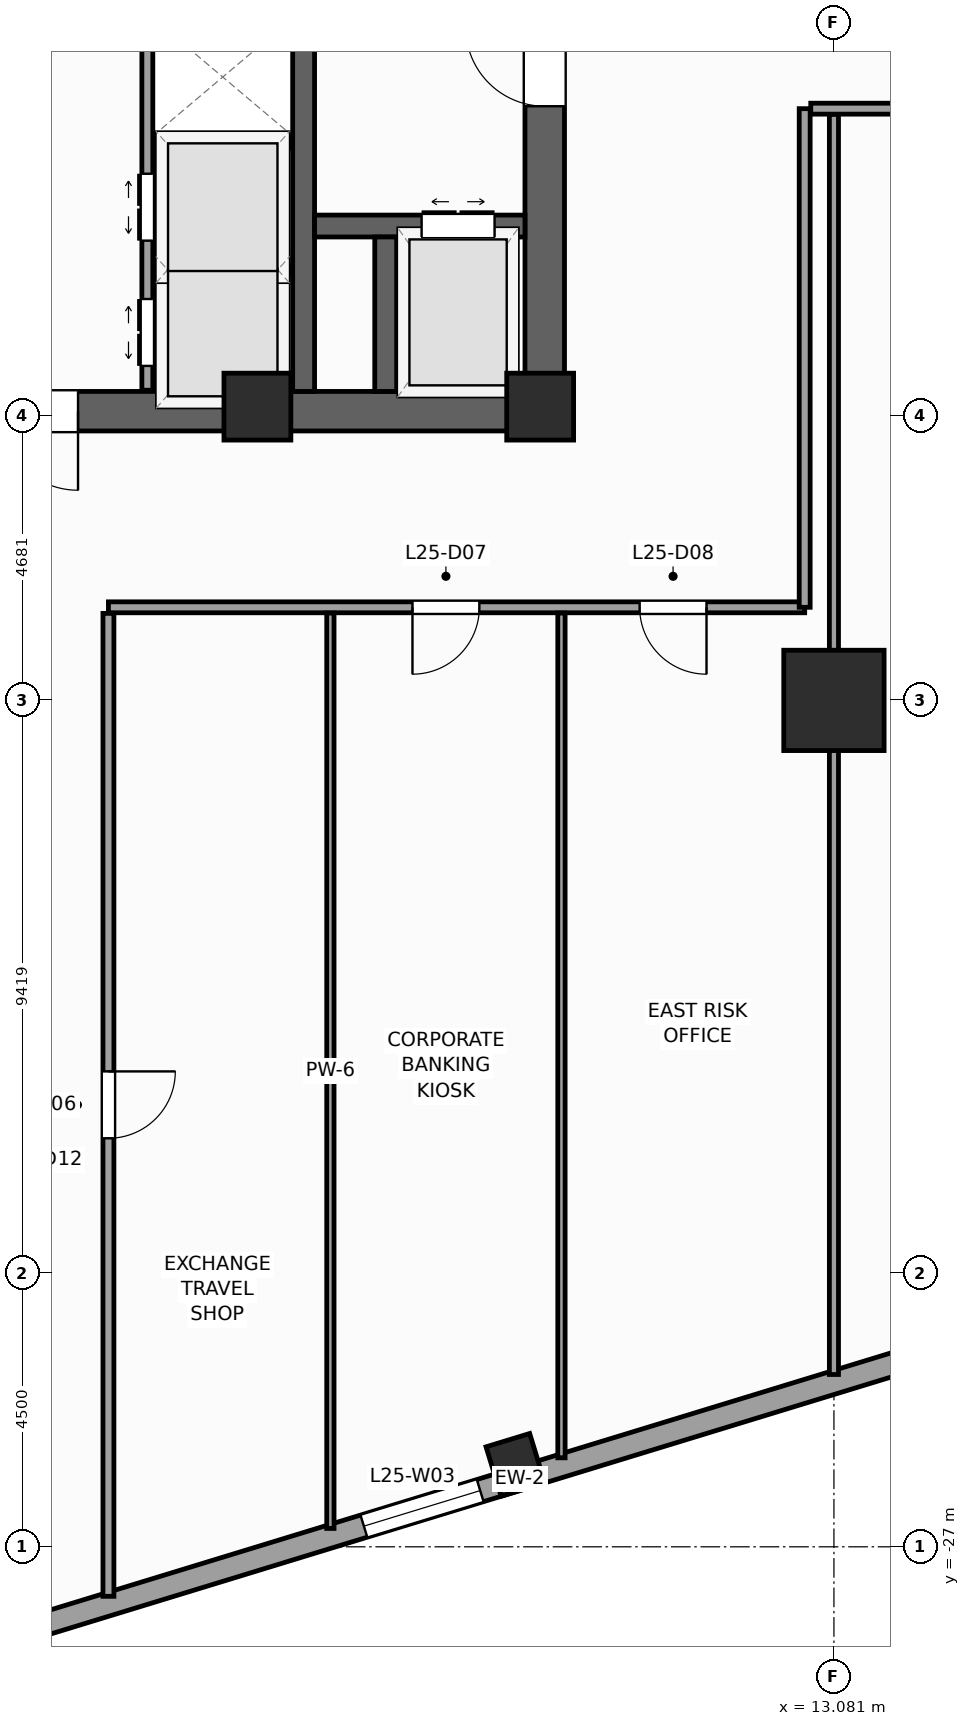
"""IFC4 building model, lengths in metres.
Left out: names, types, materials, properties, quantities, classifications, styles, units other than length and angle.
Written with IfcOpenShell. Run it as: python <this file> out.ifc"""

import sys

from ifc_helpers import new_model, si_unit, direction, frame, frame_2d, origin, origin_2d, place, context, subcontext, project, spatial, rectangle, extrude, source, transform, mapped, element, fill, save


model = new_model("IFC4")
c1 = context("Model", 3, precision=1e-05, world=origin(), true_north=direction((0.0, 1.0)))
c2 = subcontext(c1, "Body", "Model", "MODEL_VIEW")
j1 = project(units=[si_unit("LENGTHUNIT", "METRE"), si_unit("PLANEANGLEUNIT", "RADIAN")], contexts=[c1])
p1 = place(None, origin())
s1 = spatial("IfcSite", under=j1, at=p1, CompositionType="ELEMENT")
p2 = place(p1, origin())
s2 = spatial("IfcBuilding", under=s1, at=p2, CompositionType="ELEMENT")
p3 = place(p2, frame((0.0, 0.0, 107.2)))
s3 = spatial("IfcBuildingStorey", under=s2, at=p3, CompositionType="ELEMENT", Elevation=107.2)
p4 = place(p3, frame((-8.65, -8.325, 0.0), z_axis=(0.0, 0.0, 1.0), x_axis=(1.0, 0.0, 0.0)))
e1 = element("IfcWall", 1, at=p4, inside=s3, PredefinedType="SHEAR", context=c2, shape_type="SweptSolid", body=[
    extrude(rectangle(XDim=17.3, YDim=0.65, at=frame_2d((8.65, 0.0))), origin(), (0.0, 0.0, 1.0), 4.0),
])
p5 = place(p4, frame((8.0, 0.0, 0.0)))
e2 = element("IfcOpeningElement", 2, at=p5, cuts=e1, PredefinedType="OPENING", context=c2, shape_type="SweptSolid", body=[
    extrude(rectangle(XDim=1.3, YDim=2.2, at=frame_2d((0.65, 1.1))), frame((0.0, 0.335, 0.0), z_axis=(0.0, -1.0, 0.0), x_axis=(1.0, 0.0, 0.0)), (0.0, 0.0, 1.0), 0.67),
])
p6 = place(p3, frame((8.325, -8.0, 0.0), z_axis=(0.0, 0.0, 1.0), x_axis=(0.0, 1.0, 0.0)))
e3 = element("IfcWall", 3, at=p6, inside=s3, PredefinedType="SHEAR", context=c2, shape_type="SweptSolid", body=[
    extrude(rectangle(XDim=16.0, YDim=0.65, at=frame_2d((8.0, 0.0))), origin(), (0.0, 0.0, 1.0), 4.0),
])
p7 = place(p6, frame((4.69, 0.0, 0.0)))
e4 = element("IfcOpeningElement", 4, at=p7, cuts=e3, PredefinedType="OPENING", context=c2, shape_type="SweptSolid", body=[
    extrude(rectangle(XDim=1.3, YDim=2.2, at=frame_2d((0.65, 1.1))), frame((0.0, 0.335, 0.0), z_axis=(0.0, -1.0, 0.0), x_axis=(1.0, 0.0, 0.0)), (0.0, 0.0, 1.0), 0.67),
])
p8 = place(p3, frame((4.36, -8.0, 0.0), z_axis=(0.0, 0.0, 1.0), x_axis=(0.0, 1.0, 0.0)))
e5 = element("IfcWall", 5, at=p8, inside=s3, PredefinedType="SHEAR", context=c2, shape_type="SweptSolid", body=[
    extrude(rectangle(XDim=16.0, YDim=0.36, at=frame_2d((8.0, 0.0))), origin(), (0.0, 0.0, 1.0), 4.0),
])
p9 = place(p3, frame((4.54, -5.28, 0.0), z_axis=(0.0, 0.0, 1.0), x_axis=(1.0, 0.0, 0.0)))
e6 = element("IfcWall", 6, at=p9, inside=s3, PredefinedType="SHEAR", context=c2, shape_type="SweptSolid", body=[
    extrude(rectangle(XDim=3.46, YDim=0.36, at=frame_2d((1.73, 0.0))), origin(), (0.0, 0.0, 1.0), 4.0),
])
p10 = place(p9, frame((1.76, 0.0, 0.0)))
e7 = element("IfcOpeningElement", 7, at=p10, cuts=e6, PredefinedType="OPENING", context=c2, shape_type="SweptSolid", body=[
    extrude(rectangle(XDim=1.2, YDim=2.25, at=frame_2d((0.6, 1.125))), frame((0.0, 0.19, 0.0), z_axis=(0.0, -1.0, 0.0), x_axis=(1.0, 0.0, 0.0)), (0.0, 0.0, 1.0), 0.38),
])
p11 = place(p3, frame((5.71, -8.0, 0.0), z_axis=(0.0, 0.0, 1.0), x_axis=(0.0, 1.0, 0.0)))
e8 = element("IfcWall", 8, at=p11, inside=s3, PredefinedType="SHEAR", context=c2, shape_type="SweptSolid", body=[
    extrude(rectangle(XDim=2.54, YDim=0.36, at=frame_2d((1.27, 0.0))), origin(), (0.0, 0.0, 1.0), 4.0),
])
m1 = source(origin(), c2, "Body", "SweptSolid", [
    extrude(rectangle(XDim=1.1, YDim=1.1, at=origin_2d()), origin(), (0.0, 0.0, 1.0), 4.0),
])
for number, where, z_axis, x_axis in (
    (9, (8.25, -8.25, 0.0), (0.0, 0.0, 1.0), (1.0, 0.0, 0.0)),
    (10, (3.6, -8.25, 0.0), (0.0, 0.0, 1.0), (1.0, 0.0, 0.0)),
):
    element("IfcColumn", number, at=place(p3, frame(where, z_axis=z_axis, x_axis=x_axis)), inside=s3, PredefinedType="PILASTER", context=c2, shape_type="MappedRepresentation", body=[
        mapped(m1, transform((0.0, 0.0, 0.0), scale=1.0)),
    ])
m2 = source(origin(), c2, "Body", "SweptSolid", [
    extrude(rectangle(XDim=1.65, YDim=1.65, at=origin_2d()), origin(), (0.0, 0.0, 1.0), 4.0),
])
p12 = place(p3, frame((13.081, -13.081, 0.0), z_axis=(0.0, 0.0, 1.0), x_axis=(1.0, 0.0, 0.0)))
e11 = element("IfcColumn", 11, at=p12, inside=s3, PredefinedType="COLUMN", context=c2, shape_type="MappedRepresentation", body=[
    mapped(m2, transform((0.0, 0.0, 0.0), scale=1.0)),
])
m3 = source(origin(), c2, "Body", "SweptSolid", [
    extrude(rectangle(XDim=0.75, YDim=0.85, at=origin_2d()), origin(), (0.0, 0.0, 1.0), 4.0),
])
p13 = place(p3, frame((7.843, -25.653, 0.0), z_axis=(0.0, 0.0, 1.0), x_axis=(0.956304755963, 0.292371704723, 0.0)))
e12 = element("IfcColumn", 12, at=p13, inside=s3, PredefinedType="COLUMN", context=c2, shape_type="MappedRepresentation", body=[
    mapped(m3, transform((0.0, 0.0, 0.0), scale=1.0)),
])
p14 = place(p3, frame((-14.265, -32.658, 0.0), z_axis=(0.0, 0.0, 1.0), x_axis=(0.956304320851, 0.292373127906, 0.0)))
e13 = element("IfcWall", 13, at=p14, inside=s3, PredefinedType="STANDARD", context=c2, shape_type="SweptSolid", body=[
    extrude(rectangle(XDim=46.38, YDim=0.38, at=frame_2d((23.19, 0.0))), origin(), (0.0, 0.0, 1.0), 3.14),
])
p15 = place(p14, frame((4.865, 0.0, 0.51)))
e14 = element("IfcOpeningElement", 14, at=p15, cuts=e13, PredefinedType="OPENING", context=c2, shape_type="SweptSolid", body=[
    extrude(rectangle(XDim=1.4, YDim=2.4, at=frame_2d((0.7, 1.2))), frame((0.0, 0.2, 0.0), z_axis=(0.0, -1.0, 0.0), x_axis=(1.0, 0.0, 0.0)), (0.0, 0.0, 1.0), 0.4),
])
p16 = place(p14, frame((10.95, 0.0, 0.51)))
e15 = element("IfcOpeningElement", 15, at=p16, cuts=e13, PredefinedType="OPENING", context=c2, shape_type="SweptSolid", body=[
    extrude(rectangle(XDim=2.0, YDim=2.4, at=frame_2d((1.0, 1.2))), frame((0.0, 0.2, 0.0), z_axis=(0.0, -1.0, 0.0), x_axis=(1.0, 0.0, 0.0)), (0.0, 0.0, 1.0), 0.4),
])
p17 = place(p14, frame((20.512, 0.0, 0.51)))
e16 = element("IfcOpeningElement", 16, at=p17, cuts=e13, PredefinedType="OPENING", context=c2, shape_type="SweptSolid", body=[
    extrude(rectangle(XDim=2.0, YDim=2.4, at=frame_2d((1.0, 1.2))), frame((0.0, 0.2, 0.0), z_axis=(0.0, -1.0, 0.0), x_axis=(1.0, 0.0, 0.0)), (0.0, 0.0, 1.0), 0.4),
])
p18 = place(p14, frame((30.538, 0.0, 0.51)))
e17 = element("IfcOpeningElement", 17, at=p18, cuts=e13, PredefinedType="OPENING", context=c2, shape_type="SweptSolid", body=[
    extrude(rectangle(XDim=2.0, YDim=2.4, at=frame_2d((1.0, 1.2))), frame((0.0, 0.2, 0.0), z_axis=(0.0, -1.0, 0.0), x_axis=(1.0, 0.0, 0.0)), (0.0, 0.0, 1.0), 0.4),
])
p19 = place(p14, frame((39.187, 0.0, 0.51)))
e18 = element("IfcOpeningElement", 18, at=p19, cuts=e13, PredefinedType="OPENING", context=c2, shape_type="SweptSolid", body=[
    extrude(rectangle(XDim=1.4, YDim=2.4, at=frame_2d((0.7, 1.2))), frame((0.0, 0.2, 0.0), z_axis=(0.0, -1.0, 0.0), x_axis=(1.0, 0.0, 0.0)), (0.0, 0.0, 1.0), 0.4),
])
p20 = place(p3, frame((1.79, -7.98, 0.0), z_axis=(0.0, 0.0, 1.0), x_axis=(0.0, 1.0, 0.0)))
e19 = element("IfcWall", 19, at=p20, inside=s3, PredefinedType="PARTITIONING", context=c2, shape_type="SweptSolid", body=[
    extrude(rectangle(XDim=12.38, YDim=0.18, at=frame_2d((6.19, 0.0))), origin(), (0.0, 0.0, 1.0), 3.74),
])
p21 = place(p20, frame((0.4, 0.0, 0.0)))
e20 = element("IfcOpeningElement", 20, at=p21, cuts=e19, PredefinedType="OPENING", context=c2, shape_type="SweptSolid", body=[
    extrude(rectangle(XDim=1.1, YDim=2.2, at=frame_2d((0.55, 1.1))), frame((0.0, 0.1, 0.0), z_axis=(0.0, -1.0, 0.0), x_axis=(1.0, 0.0, 0.0)), (0.0, 0.0, 1.0), 0.2),
])
p22 = place(p20, frame((2.46, 0.0, 0.0)))
e21 = element("IfcOpeningElement", 21, at=p22, cuts=e19, PredefinedType="OPENING", context=c2, shape_type="SweptSolid", body=[
    extrude(rectangle(XDim=1.1, YDim=2.2, at=frame_2d((0.55, 1.1))), frame((0.0, 0.1, 0.0), z_axis=(0.0, -1.0, 0.0), x_axis=(1.0, 0.0, 0.0)), (0.0, 0.0, 1.0), 0.2),
])
p23 = place(p3, frame((1.89, -3.9, 0.0), z_axis=(0.0, 0.0, 1.0), x_axis=(1.0, 0.0, 0.0)))
e22 = element("IfcWall", 22, at=p23, inside=s3, PredefinedType="PARTITIONING", context=c2, shape_type="SweptSolid", body=[
    extrude(rectangle(XDim=2.28, YDim=0.18, at=frame_2d((1.14, 0.0))), origin(), (0.0, 0.0, 1.0), 3.74),
])
p24 = place(p3, frame((1.9, -6.0, 0.0), z_axis=(0.0, 0.0, 1.0), x_axis=(1.0, 0.0, 0.0)))
e23 = element("IfcWall", 23, at=p24, inside=s3, PredefinedType="PARTITIONING", context=c2, shape_type="SweptSolid", body=[
    extrude(rectangle(XDim=2.26, YDim=0.12, at=frame_2d((1.13, 0.0))), origin(), (0.0, 0.0, 1.0), 3.74),
])
p25 = place(p3, frame((1.15, -11.55, 0.0), z_axis=(0.0, 0.0, 1.0), x_axis=(1.0, 0.0, 0.0)))
e24 = element("IfcWall", 24, at=p25, inside=s3, PredefinedType="PARTITIONING", context=c2, shape_type="SweptSolid", body=[
    extrude(rectangle(XDim=11.45, YDim=0.18, at=frame_2d((5.725, 0.0))), origin(), (0.0, 0.0, 1.0), 3.74),
])
p26 = place(p25, frame((5.0, 0.0, 0.0)))
e25 = element("IfcOpeningElement", 25, at=p26, cuts=e24, PredefinedType="OPENING", context=c2, shape_type="SweptSolid", body=[
    extrude(rectangle(XDim=1.1, YDim=2.2, at=frame_2d((0.55, 1.1))), frame((0.0, 0.1, 0.0), z_axis=(0.0, -1.0, 0.0), x_axis=(1.0, 0.0, 0.0)), (0.0, 0.0, 1.0), 0.2),
])
p27 = place(p25, frame((8.736, 0.0, 0.0)))
e26 = element("IfcOpeningElement", 26, at=p27, cuts=e24, PredefinedType="OPENING", context=c2, shape_type="SweptSolid", body=[
    extrude(rectangle(XDim=1.1, YDim=2.2, at=frame_2d((0.55, 1.1))), frame((0.0, 0.1, 0.0), z_axis=(0.0, -1.0, 0.0), x_axis=(1.0, 0.0, 0.0)), (0.0, 0.0, 1.0), 0.2),
])
p28 = place(p3, frame((12.6, -11.55, 0.0), z_axis=(0.0, 0.0, 1.0), x_axis=(0.0, 1.0, 0.0)))
e27 = element("IfcWall", 27, at=p28, inside=s3, PredefinedType="PARTITIONING", context=c2, shape_type="SweptSolid", body=[
    extrude(rectangle(XDim=8.2, YDim=0.18, at=frame_2d((4.1, 0.0))), origin(), (0.0, 0.0, 1.0), 3.74),
])
p29 = place(p3, frame((12.7, -3.35, 0.0), z_axis=(0.0, 0.0, 1.0), x_axis=(1.0, 0.0, 0.0)))
e28 = element("IfcWall", 28, at=p29, inside=s3, PredefinedType="PARTITIONING", context=c2, shape_type="SweptSolid", body=[
    extrude(rectangle(XDim=16.49, YDim=0.18, at=frame_2d((8.245, 0.0))), origin(), (0.0, 0.0, 1.0), 3.74),
])
p30 = place(p29, frame((7.721, 0.0, 0.0)))
e29 = element("IfcOpeningElement", 29, at=p30, cuts=e28, PredefinedType="OPENING", context=c2, shape_type="SweptSolid", body=[
    extrude(rectangle(XDim=1.1, YDim=2.2, at=frame_2d((0.55, 1.1))), frame((0.0, 0.1, 0.0), z_axis=(0.0, -1.0, 0.0), x_axis=(1.0, 0.0, 0.0)), (0.0, 0.0, 1.0), 0.2),
])
p31 = place(p3, frame((1.15, -27.814, 0.0), z_axis=(0.0, 0.0, 1.0), x_axis=(0.0, 1.0, 0.0)))
e30 = element("IfcWall", 30, at=p31, inside=s3, PredefinedType="PARTITIONING", context=c2, shape_type="SweptSolid", body=[
    extrude(rectangle(XDim=16.164, YDim=0.18, at=frame_2d((8.082, 0.0))), origin(), (0.0, 0.0, 1.0), 3.74),
])
p32 = place(p31, frame((7.532, 0.0, 0.0)))
e31 = element("IfcOpeningElement", 31, at=p32, cuts=e30, PredefinedType="OPENING", context=c2, shape_type="SweptSolid", body=[
    extrude(rectangle(XDim=1.1, YDim=2.2, at=frame_2d((0.55, 1.1))), frame((0.0, 0.1, 0.0), z_axis=(0.0, -1.0, 0.0), x_axis=(1.0, 0.0, 0.0)), (0.0, 0.0, 1.0), 0.2),
])
p33 = place(p3, frame((4.8, -26.698, 0.0), z_axis=(0.0, 0.0, 1.0), x_axis=(0.0, 1.0, 0.0)))
e32 = element("IfcWall", 32, at=p33, inside=s3, PredefinedType="PARTITIONING", context=c2, shape_type="SweptSolid", body=[
    extrude(rectangle(XDim=15.053, YDim=0.12, at=frame_2d((7.527, 0.0))), origin(), (0.0, 0.0, 1.0), 3.74),
])
p34 = place(p3, frame((8.6, -25.536, 0.0), z_axis=(0.0, 0.0, 1.0), x_axis=(0.0, 1.0, 0.0)))
e33 = element("IfcWall", 33, at=p34, inside=s3, PredefinedType="PARTITIONING", context=c2, shape_type="SweptSolid", body=[
    extrude(rectangle(XDim=13.891, YDim=0.12, at=frame_2d((6.946, 0.0))), origin(), (0.0, 0.0, 1.0), 3.04),
])
p35 = place(p3, frame((13.081, -24.167, 0.0), z_axis=(0.0, 0.0, 1.0), x_axis=(0.0, 1.0, 0.0)))
e34 = element("IfcWall", 34, at=p35, inside=s3, PredefinedType="PARTITIONING", context=c2, shape_type="SweptSolid", body=[
    extrude(rectangle(XDim=20.721, YDim=0.15, at=frame_2d((10.361, 0.0))), origin(), (0.0, 0.0, 1.0), 2.732),
])
m4 = source(origin(), c2, "Body", "SweptSolid", [
    extrude(rectangle(XDim=2.0, YDim=2.4, at=frame_2d((1.0, 1.2))), frame((0.0, 0.03, 0.0), z_axis=(0.0, -1.0, 0.0), x_axis=(1.0, 0.0, 0.0)), (0.0, 0.0, 1.0), 0.06),
])
p36 = place(p17, origin())
e35 = element("IfcWindow", 35, at=p36, inside=s3, PartitioningType="SINGLE_PANEL", PredefinedType="WINDOW", context=c2, shape_type="MappedRepresentation", body=[
    mapped(m4, transform((0.0, 0.0, 0.0), scale=1.0)),
])
fill(e16, e35)
m5 = source(origin(), c2, "Body", "SweptSolid", [
    extrude(rectangle(XDim=1.3, YDim=2.2, at=frame_2d((0.65, 1.1))), frame((0.0, 0.025, 0.0), z_axis=(0.0, -1.0, 0.0), x_axis=(1.0, 0.0, 0.0)), (0.0, 0.0, 1.0), 0.05),
])
p37 = place(p7, origin())
e36 = element("IfcDoor", 36, at=p37, inside=s3, OperationType="SINGLE_SWING_RIGHT", PredefinedType="DOOR", context=c2, shape_type="MappedRepresentation", body=[
    mapped(m5, transform((0.0, 0.0, 0.0), scale=1.0)),
])
fill(e4, e36)
p38 = place(p5, frame((1.3, 0.0, 0.0), z_axis=(0.0, 0.0, 1.0), x_axis=(-1.0, 0.0, 0.0)))
e37 = element("IfcDoor", 37, at=p38, inside=s3, OperationType="SINGLE_SWING_RIGHT", PredefinedType="DOOR", context=c2, shape_type="MappedRepresentation", body=[
    mapped(m5, transform((0.0, 0.0, 0.0), scale=1.0)),
])
fill(e2, e37)
m6 = source(origin(), c2, "Body", "SweptSolid", [
    extrude(rectangle(XDim=1.2, YDim=2.25, at=frame_2d((0.6, 1.125))), frame((0.0, 0.025, 0.0), z_axis=(0.0, -1.0, 0.0), x_axis=(1.0, 0.0, 0.0)), (0.0, 0.0, 1.0), 0.05),
])
p39 = place(p10, origin())
e38 = element("IfcDoor", 38, at=p39, inside=s3, OperationType="DOUBLE_DOOR_SLIDING", PredefinedType="DOOR", context=c2, shape_type="MappedRepresentation", body=[
    mapped(m6, transform((0.0, 0.0, 0.0), scale=1.0)),
])
fill(e7, e38)
m7 = source(origin(), c2, "Body", "SweptSolid", [
    extrude(rectangle(XDim=1.1, YDim=2.2, at=frame_2d((0.55, 1.1))), frame((0.0, 0.025, 0.0), z_axis=(0.0, -1.0, 0.0), x_axis=(1.0, 0.0, 0.0)), (0.0, 0.0, 1.0), 0.05),
])
p40 = place(p21, origin())
e39 = element("IfcDoor", 39, at=p40, inside=s3, OperationType="DOUBLE_DOOR_SLIDING", PredefinedType="DOOR", context=c2, shape_type="MappedRepresentation", body=[
    mapped(m7, transform((0.0, 0.0, 0.0), scale=1.0)),
])
fill(e20, e39)
p41 = place(p22, origin())
e40 = element("IfcDoor", 40, at=p41, inside=s3, OperationType="DOUBLE_DOOR_SLIDING", PredefinedType="DOOR", context=c2, shape_type="MappedRepresentation", body=[
    mapped(m7, transform((0.0, 0.0, 0.0), scale=1.0)),
])
fill(e21, e40)
p42 = place(p32, frame((1.1, 0.0, 0.0), z_axis=(0.0, 0.0, 1.0), x_axis=(-1.0, 0.0, 0.0)))
e41 = element("IfcDoor", 41, at=p42, inside=s3, OperationType="SINGLE_SWING_RIGHT", PredefinedType="DOOR", context=c2, shape_type="MappedRepresentation", body=[
    mapped(m7, transform((0.0, 0.0, 0.0), scale=1.0)),
])
fill(e31, e41)
p43 = place(p26, frame((1.1, 0.0, 0.0), z_axis=(0.0, 0.0, 1.0), x_axis=(-1.0, 0.0, 0.0)))
e42 = element("IfcDoor", 42, at=p43, inside=s3, OperationType="SINGLE_SWING_LEFT", PredefinedType="DOOR", context=c2, shape_type="MappedRepresentation", body=[
    mapped(m7, transform((0.0, 0.0, 0.0), scale=1.0)),
])
fill(e25, e42)
p44 = place(p27, frame((1.1, 0.0, 0.0), z_axis=(0.0, 0.0, 1.0), x_axis=(-1.0, 0.0, 0.0)))
e43 = element("IfcDoor", 43, at=p44, inside=s3, OperationType="SINGLE_SWING_RIGHT", PredefinedType="DOOR", context=c2, shape_type="MappedRepresentation", body=[
    mapped(m7, transform((0.0, 0.0, 0.0), scale=1.0)),
])
fill(e26, e43)
save(model, sys.argv[1])
